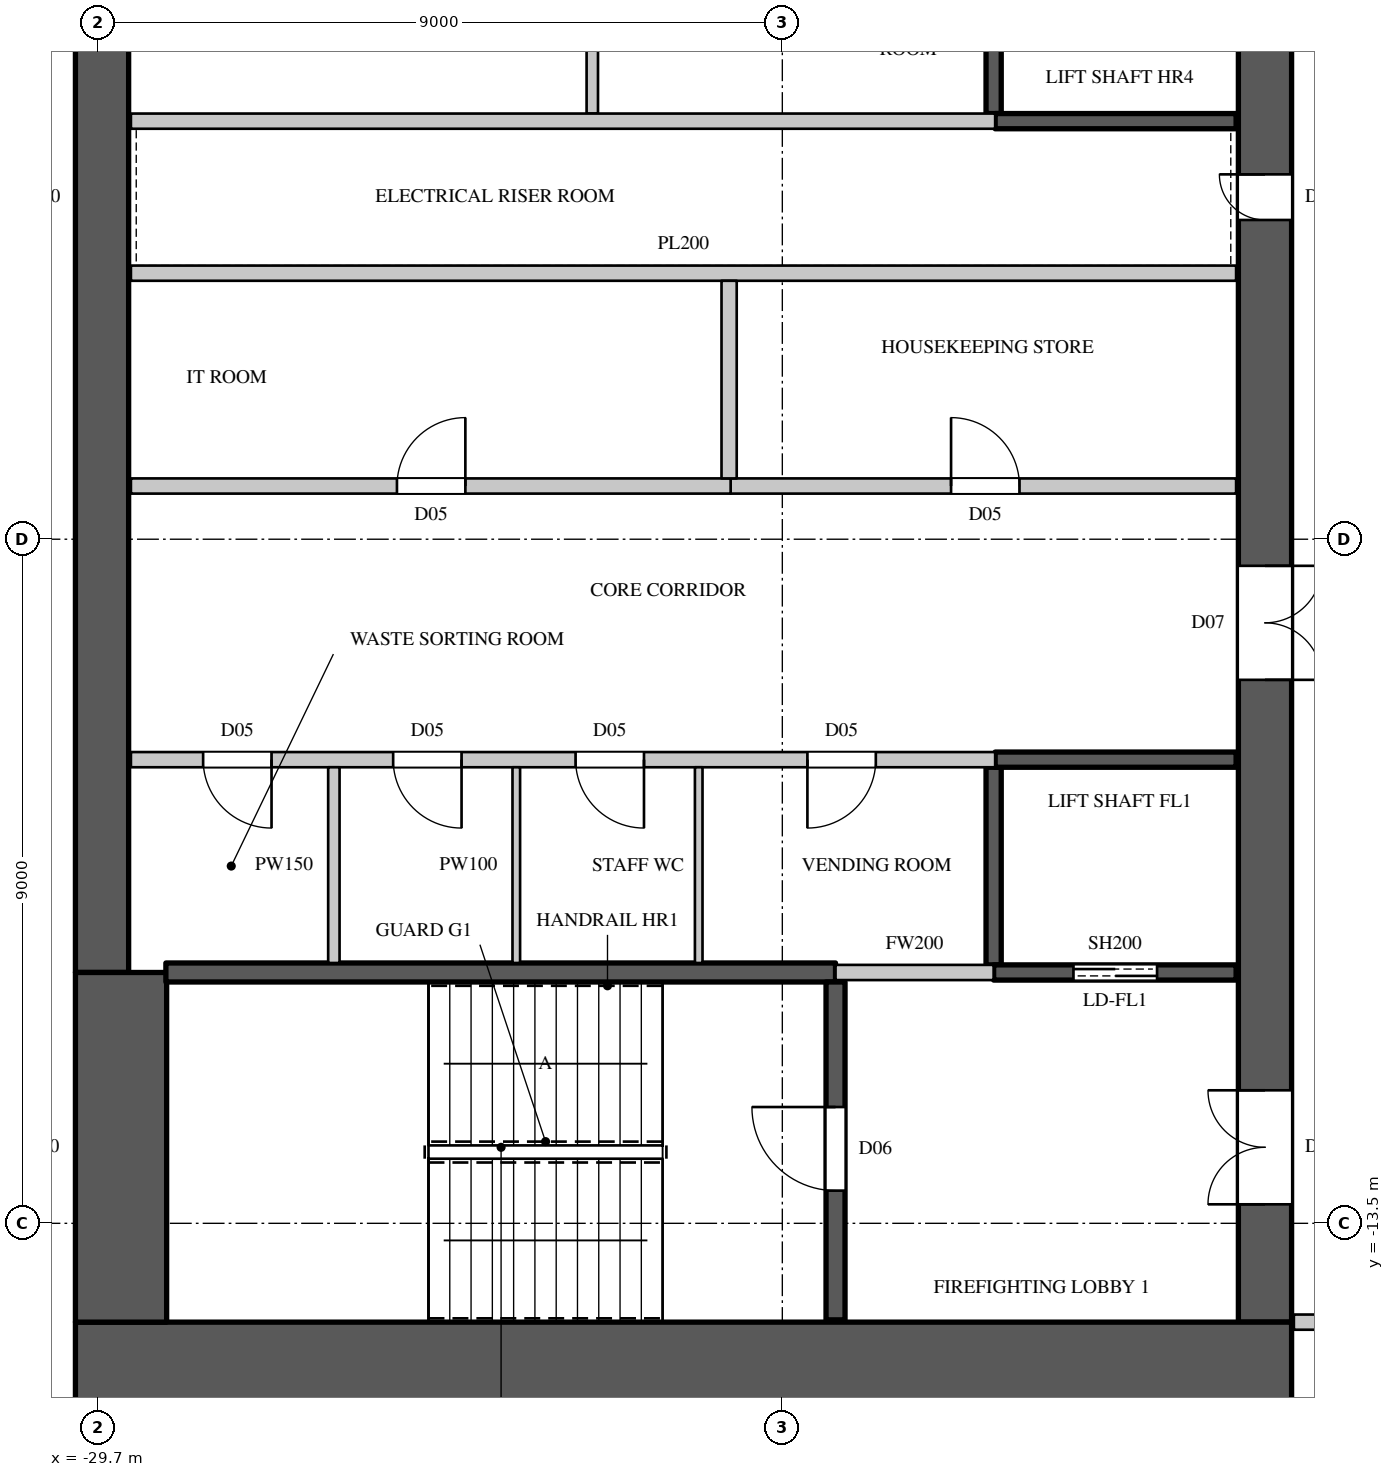
"""IFC4 building model, lengths in metres.
Left out: names, types, materials, properties, quantities, classifications, styles, units other than length and angle.
Written with IfcOpenShell. Run it as: python <this file> out.ifc"""

import sys

from ifc_helpers import new_model, si_unit, direction, frame, frame_2d, origin, place, context, subcontext, project, spatial, rectangle, extrude, element, fill, save


model = new_model("IFC4")
c1 = context("Model", 3, precision=1e-05, world=origin(), true_north=direction((0.0, 1.0)))
c2 = subcontext(c1, "Body", "Model", "MODEL_VIEW")
j1 = project(units=[si_unit("LENGTHUNIT", "METRE"), si_unit("PLANEANGLEUNIT", "RADIAN")], contexts=[c1])
p1 = place(None, origin())
s1 = spatial("IfcSite", under=j1, at=p1, CompositionType="ELEMENT")
p2 = place(p1, origin())
s2 = spatial("IfcBuilding", under=s1, at=p2, CompositionType="ELEMENT")
p3 = place(p2, frame((0.0, 0.0, 243.4)))
s3 = spatial("IfcBuildingStorey", under=s2, at=p3, CompositionType="ELEMENT", Elevation=243.4)
p4 = place(p3, frame((-30.0, -15.4, 0.0), z_axis=(0.0, 0.0, 1.0), x_axis=(1.0, 0.0, 0.0)))
e1 = element("IfcWall", 1, at=p4, inside=s3, PredefinedType="SHEAR", context=c2, shape_type="SweptSolid", body=[
    extrude(rectangle(XDim=16.0, YDim=1.2, at=frame_2d((8.0, 0.0))), origin(), (0.0, 0.0, 1.0), 4.1),
])
p5 = place(p3, frame((-14.35, -14.8, 0.0), z_axis=(0.0, 0.0, 1.0), x_axis=(0.0, 1.0, 0.0)))
e2 = element("IfcWall", 2, at=p5, inside=s3, PredefinedType="SHEAR", context=c2, shape_type="SweptSolid", body=[
    extrude(rectangle(XDim=29.6, YDim=0.7, at=frame_2d((14.8, 0.0))), origin(), (0.0, 0.0, 1.0), 4.1),
])
p6 = place(p5, frame((1.55, 0.0, 0.0)))
e3 = element("IfcOpeningElement", 3, at=p6, cuts=e2, PredefinedType="OPENING", context=c2, shape_type="SweptSolid", body=[
    extrude(rectangle(XDim=1.5, YDim=2.4, at=frame_2d((0.75, 1.2))), frame((0.0, 0.36, 0.0), z_axis=(0.0, -1.0, 0.0), x_axis=(1.0, 0.0, 0.0)), (0.0, 0.0, 1.0), 0.72),
])
p7 = place(p5, frame((26.55, 0.0, 0.0)))
e4 = element("IfcOpeningElement", 4, at=p7, cuts=e2, PredefinedType="OPENING", context=c2, shape_type="SweptSolid", body=[
    extrude(rectangle(XDim=1.5, YDim=2.4, at=frame_2d((0.75, 1.2))), frame((0.0, 0.36, 0.0), z_axis=(0.0, -1.0, 0.0), x_axis=(1.0, 0.0, 0.0)), (0.0, 0.0, 1.0), 0.72),
])
p8 = place(p5, frame((8.45, 0.0, 0.0)))
e5 = element("IfcOpeningElement", 5, at=p8, cuts=e2, PredefinedType="OPENING", context=c2, shape_type="SweptSolid", body=[
    extrude(rectangle(XDim=1.5, YDim=2.4, at=frame_2d((0.75, 1.2))), frame((0.0, 0.36, 0.0), z_axis=(0.0, -1.0, 0.0), x_axis=(1.0, 0.0, 0.0)), (0.0, 0.0, 1.0), 0.72),
])
p9 = place(p5, frame((19.65, 0.0, 0.0)))
e6 = element("IfcOpeningElement", 6, at=p9, cuts=e2, PredefinedType="OPENING", context=c2, shape_type="SweptSolid", body=[
    extrude(rectangle(XDim=1.5, YDim=2.4, at=frame_2d((0.75, 1.2))), frame((0.0, 0.36, 0.0), z_axis=(0.0, -1.0, 0.0), x_axis=(1.0, 0.0, 0.0)), (0.0, 0.0, 1.0), 0.72),
])
p10 = place(p5, frame((14.5, 0.0, 0.0)))
e7 = element("IfcOpeningElement", 7, at=p10, cuts=e2, PredefinedType="OPENING", context=c2, shape_type="SweptSolid", body=[
    extrude(rectangle(XDim=0.6, YDim=2.0, at=frame_2d((0.3, 1.0))), frame((0.0, 0.36, 0.0), z_axis=(0.0, -1.0, 0.0), x_axis=(1.0, 0.0, 0.0)), (0.0, 0.0, 1.0), 0.72),
])
p11 = place(p3, frame((-29.65, -10.2, 0.0), z_axis=(0.0, 0.0, 1.0), x_axis=(0.0, 1.0, 0.0)))
e8 = element("IfcWall", 8, at=p11, inside=s3, PredefinedType="SHEAR", context=c2, shape_type="SweptSolid", body=[
    extrude(rectangle(XDim=20.4, YDim=0.7, at=frame_2d((10.2, 0.0))), origin(), (0.0, 0.0, 1.0), 4.1),
])
p12 = place(p3, frame((-29.4, -14.8, 0.0), z_axis=(0.0, 0.0, 1.0), x_axis=(0.0, 1.0, 0.0)))
e9 = element("IfcWall", 9, at=p12, inside=s3, PredefinedType="SHEAR", context=c2, shape_type="SweptSolid", body=[
    extrude(rectangle(XDim=4.6, YDim=1.2, at=frame_2d((2.3, 0.0))), origin(), (0.0, 0.0, 1.0), 4.1),
])
p13 = place(p3, frame((-29.27, -7.4, 0.0), z_axis=(0.0, 0.0, 1.0), x_axis=(1.0, 0.0, 0.0)))
e10 = element("IfcWall", 10, at=p13, inside=s3, PredefinedType="PARTITIONING", context=c2, shape_type="SweptSolid", body=[
    extrude(rectangle(XDim=11.37, YDim=0.2, at=frame_2d((5.685, 0.0))), origin(), (0.0, 0.0, 1.0), 3.8),
])
p14 = place(p13, frame((0.95, 0.0, 0.0)))
e11 = element("IfcOpeningElement", 11, at=p14, cuts=e10, PredefinedType="OPENING", context=c2, shape_type="SweptSolid", body=[
    extrude(rectangle(XDim=0.9, YDim=2.2, at=frame_2d((0.45, 1.1))), frame((0.0, 0.11, 0.0), z_axis=(0.0, -1.0, 0.0), x_axis=(1.0, 0.0, 0.0)), (0.0, 0.0, 1.0), 0.22),
])
p15 = place(p13, frame((3.45, 0.0, 0.0)))
e12 = element("IfcOpeningElement", 12, at=p15, cuts=e10, PredefinedType="OPENING", context=c2, shape_type="SweptSolid", body=[
    extrude(rectangle(XDim=0.9, YDim=2.2, at=frame_2d((0.45, 1.1))), frame((0.0, 0.11, 0.0), z_axis=(0.0, -1.0, 0.0), x_axis=(1.0, 0.0, 0.0)), (0.0, 0.0, 1.0), 0.22),
])
p16 = place(p13, frame((5.85, 0.0, 0.0)))
e13 = element("IfcOpeningElement", 13, at=p16, cuts=e10, PredefinedType="OPENING", context=c2, shape_type="SweptSolid", body=[
    extrude(rectangle(XDim=0.9, YDim=2.2, at=frame_2d((0.45, 1.1))), frame((0.0, 0.11, 0.0), z_axis=(0.0, -1.0, 0.0), x_axis=(1.0, 0.0, 0.0)), (0.0, 0.0, 1.0), 0.22),
])
p17 = place(p13, frame((8.9, 0.0, 0.0)))
e14 = element("IfcOpeningElement", 14, at=p17, cuts=e10, PredefinedType="OPENING", context=c2, shape_type="SweptSolid", body=[
    extrude(rectangle(XDim=0.9, YDim=2.2, at=frame_2d((0.45, 1.1))), frame((0.0, 0.11, 0.0), z_axis=(0.0, -1.0, 0.0), x_axis=(1.0, 0.0, 0.0)), (0.0, 0.0, 1.0), 0.22),
])
p18 = place(p3, frame((-21.38, -3.8, 0.0), z_axis=(0.0, 0.0, 1.0), x_axis=(1.0, 0.0, 0.0)))
e15 = element("IfcWall", 15, at=p18, inside=s3, PredefinedType="PARTITIONING", context=c2, shape_type="SweptSolid", body=[
    extrude(rectangle(XDim=6.65, YDim=0.2, at=frame_2d((3.325, 0.0))), origin(), (0.0, 0.0, 1.0), 3.8),
])
p19 = place(p18, frame((2.9, 0.0, 0.0)))
e16 = element("IfcOpeningElement", 16, at=p19, cuts=e15, PredefinedType="OPENING", context=c2, shape_type="SweptSolid", body=[
    extrude(rectangle(XDim=0.9, YDim=2.2, at=frame_2d((0.45, 1.1))), frame((0.0, 0.11, 0.0), z_axis=(0.0, -1.0, 0.0), x_axis=(1.0, 0.0, 0.0)), (0.0, 0.0, 1.0), 0.22),
])
p20 = place(p3, frame((-20.0, -10.2, 0.0), z_axis=(0.0, 0.0, 1.0), x_axis=(1.0, 0.0, 0.0)))
e17 = element("IfcWall", 17, at=p20, inside=s3, PredefinedType="PARTITIONING", context=c2, shape_type="SweptSolid", body=[
    extrude(rectangle(XDim=2.08, YDim=0.2, at=frame_2d((1.04, 0.0))), origin(), (0.0, 0.0, 1.0), 3.8),
])
p21 = place(p3, frame((-13.97, -14.8, 0.0), z_axis=(0.0, 0.0, 1.0), x_axis=(1.0, 0.0, 0.0)))
e18 = element("IfcWall", 18, at=p21, inside=s3, PredefinedType="PARTITIONING", context=c2, shape_type="SweptSolid", body=[
    extrude(rectangle(XDim=2.87, YDim=0.2, at=frame_2d((1.435, 0.0))), origin(), (0.0, 0.0, 1.0), 3.8),
])
p22 = place(p3, frame((-26.6, -10.075, 0.0), z_axis=(0.0, 0.0, 1.0), x_axis=(0.0, 1.0, 0.0)))
e19 = element("IfcWall", 19, at=p22, inside=s3, PredefinedType="PARTITIONING", context=c2, shape_type="SweptSolid", body=[
    extrude(rectangle(XDim=2.575, YDim=0.15, at=frame_2d((1.288, 0.0))), origin(), (0.0, 0.0, 1.0), 3.8),
])
p23 = place(p3, frame((-23.2, 1.1, 0.0), z_axis=(0.0, 0.0, 1.0), x_axis=(0.0, 1.0, 0.0)))
e20 = element("IfcWall", 20, at=p23, inside=s3, PredefinedType="PARTITIONING", context=c2, shape_type="SweptSolid", body=[
    extrude(rectangle(XDim=2.6, YDim=0.15, at=frame_2d((1.3, 0.0))), origin(), (0.0, 0.0, 1.0), 3.8),
])
p24 = place(p3, frame((-29.27, -3.8, 0.0), z_axis=(0.0, 0.0, 1.0), x_axis=(1.0, 0.0, 0.0)))
e21 = element("IfcWall", 21, at=p24, inside=s3, PredefinedType="PARTITIONING", context=c2, shape_type="SweptSolid", body=[
    extrude(rectangle(XDim=7.89, YDim=0.2, at=frame_2d((3.945, 0.0))), origin(), (0.0, 0.0, 1.0), 3.8),
])
p25 = place(p24, frame((3.5, 0.0, 0.0)))
e22 = element("IfcOpeningElement", 22, at=p25, cuts=e21, PredefinedType="OPENING", context=c2, shape_type="SweptSolid", body=[
    extrude(rectangle(XDim=0.9, YDim=2.2, at=frame_2d((0.45, 1.1))), frame((0.0, 0.11, 0.0), z_axis=(0.0, -1.0, 0.0), x_axis=(1.0, 0.0, 0.0)), (0.0, 0.0, 1.0), 0.22),
])
p26 = place(p3, frame((-29.27, -1.0, 0.0), z_axis=(0.0, 0.0, 1.0), x_axis=(1.0, 0.0, 0.0)))
e23 = element("IfcWall", 23, at=p26, inside=s3, PredefinedType="PARTITIONING", context=c2, shape_type="SweptSolid", body=[
    extrude(rectangle(XDim=14.54, YDim=0.2, at=frame_2d((7.27, 0.0))), origin(), (0.0, 0.0, 1.0), 3.8),
])
p27 = place(p3, frame((-29.27, 1.0, 0.0), z_axis=(0.0, 0.0, 1.0), x_axis=(1.0, 0.0, 0.0)))
e24 = element("IfcWall", 24, at=p27, inside=s3, PredefinedType="PARTITIONING", context=c2, shape_type="SweptSolid", body=[
    extrude(rectangle(XDim=11.37, YDim=0.2, at=frame_2d((5.685, 0.0))), origin(), (0.0, 0.0, 1.0), 3.8),
])
p28 = place(p3, frame((-21.4, -3.7, 0.0), z_axis=(0.0, 0.0, 1.0), x_axis=(0.0, 1.0, 0.0)))
e25 = element("IfcWall", 25, at=p28, inside=s3, PredefinedType="PARTITIONING", context=c2, shape_type="SweptSolid", body=[
    extrude(rectangle(XDim=2.6, YDim=0.2, at=frame_2d((1.3, 0.0))), origin(), (0.0, 0.0, 1.0), 3.8),
])
p29 = place(p3, frame((-17.92, -10.1, 0.0), z_axis=(0.0, 0.0, 1.0), x_axis=(0.0, 1.0, 0.0)))
e26 = element("IfcWall", 26, at=p29, inside=s3, PredefinedType="SHEAR", context=c2, shape_type="SweptSolid", body=[
    extrude(rectangle(XDim=2.6, YDim=0.2, at=frame_2d((1.3, 0.0))), origin(), (0.0, 0.0, 1.0), 3.8),
])
p30 = place(p3, frame((-17.92, -10.2, 0.0), z_axis=(0.0, 0.0, 1.0), x_axis=(1.0, 0.0, 0.0)))
e27 = element("IfcWall", 27, at=p30, inside=s3, PredefinedType="SHEAR", context=c2, shape_type="SweptSolid", body=[
    extrude(rectangle(XDim=3.19, YDim=0.2, at=frame_2d((1.595, 0.0))), origin(), (0.0, 0.0, 1.0), 3.8),
])
p31 = place(p30, frame((1.05, 0.0, 0.0)))
e28 = element("IfcOpeningElement", 28, at=p31, cuts=e27, PredefinedType="OPENING", context=c2, shape_type="SweptSolid", body=[
    extrude(rectangle(XDim=1.1, YDim=2.2, at=frame_2d((0.55, 1.1))), frame((0.0, 0.11, 0.0), z_axis=(0.0, -1.0, 0.0), x_axis=(1.0, 0.0, 0.0)), (0.0, 0.0, 1.0), 0.22),
])
p32 = place(p3, frame((-17.9, -7.4, 0.0), z_axis=(0.0, 0.0, 1.0), x_axis=(1.0, 0.0, 0.0)))
e29 = element("IfcWall", 29, at=p32, inside=s3, PredefinedType="SHEAR", context=c2, shape_type="SweptSolid", body=[
    extrude(rectangle(XDim=3.17, YDim=0.2, at=frame_2d((1.585, 0.0))), origin(), (0.0, 0.0, 1.0), 3.8),
])
p33 = place(p3, frame((-17.92, 1.1, 0.0), z_axis=(0.0, 0.0, 1.0), x_axis=(0.0, 1.0, 0.0)))
e30 = element("IfcWall", 30, at=p33, inside=s3, PredefinedType="SHEAR", context=c2, shape_type="SweptSolid", body=[
    extrude(rectangle(XDim=2.6, YDim=0.2, at=frame_2d((1.3, 0.0))), origin(), (0.0, 0.0, 1.0), 3.8),
])
p34 = place(p3, frame((-17.9, 1.0, 0.0), z_axis=(0.0, 0.0, 1.0), x_axis=(1.0, 0.0, 0.0)))
e31 = element("IfcWall", 31, at=p34, inside=s3, PredefinedType="SHEAR", context=c2, shape_type="SweptSolid", body=[
    extrude(rectangle(XDim=3.17, YDim=0.2, at=frame_2d((1.585, 0.0))), origin(), (0.0, 0.0, 1.0), 3.8),
])
p35 = place(p3, frame((-28.81, -10.2, 0.0), z_axis=(0.0, 0.0, 1.0), x_axis=(1.0, 0.0, 0.0)))
e32 = element("IfcWall", 32, at=p35, inside=s3, PredefinedType="SHEAR", context=c2, shape_type="SweptSolid", body=[
    extrude(rectangle(XDim=8.81, YDim=0.25, at=frame_2d((4.405, 0.0))), origin(), (0.0, 0.0, 1.0), 3.8),
])
p36 = place(p3, frame((-20.0, -14.77, 0.0), z_axis=(0.0, 0.0, 1.0), x_axis=(0.0, 1.0, 0.0)))
e33 = element("IfcWall", 33, at=p36, inside=s3, PredefinedType="SHEAR", context=c2, shape_type="SweptSolid", body=[
    extrude(rectangle(XDim=4.445, YDim=0.25, at=frame_2d((2.223, 0.0))), origin(), (0.0, 0.0, 1.0), 3.8),
])
p37 = place(p36, frame((1.7, 0.0, 0.0)))
e34 = element("IfcOpeningElement", 34, at=p37, cuts=e33, PredefinedType="OPENING", context=c2, shape_type="SweptSolid", body=[
    extrude(rectangle(XDim=1.1, YDim=2.2, at=frame_2d((0.55, 1.1))), frame((0.0, 0.135, 0.0), z_axis=(0.0, -1.0, 0.0), x_axis=(1.0, 0.0, 0.0)), (0.0, 0.0, 1.0), 0.27),
])
for number, where, z_axis, x_axis in (
    (35, (-24.2, -10.075, 0.0), (0.0, 0.0, 1.0), (0.0, 1.0, 0.0)),
    (36, (-21.8, -10.075, 0.0), (0.0, 0.0, 1.0), (0.0, 1.0, 0.0)),
):
    element("IfcWall", number, at=place(p3, frame(where, z_axis=z_axis, x_axis=x_axis)), inside=s3, PredefinedType="PARTITIONING", context=c2, shape_type="SweptSolid", body=[
        extrude(rectangle(XDim=2.575, YDim=0.1, at=frame_2d((1.288, 0.0))), origin(), (0.0, 0.0, 1.0), 3.8),
    ])
p38 = place(p37, origin())
e37 = element("IfcDoor", 37, at=p38, inside=s3, OperationType="SINGLE_SWING_RIGHT", PredefinedType="DOOR", context=c2, shape_type="SweptSolid", body=[
    extrude(rectangle(XDim=1.1, YDim=2.2, at=frame_2d((0.55, 1.1))), frame((0.0, 0.025, 0.0), z_axis=(0.0, -1.0, 0.0), x_axis=(1.0, 0.0, 0.0)), (0.0, 0.0, 1.0), 0.05),
])
fill(e34, e37)
p39 = place(p14, origin())
e38 = element("IfcDoor", 38, at=p39, inside=s3, OperationType="SINGLE_SWING_LEFT", PredefinedType="DOOR", context=c2, shape_type="SweptSolid", body=[
    extrude(rectangle(XDim=0.9, YDim=2.2, at=frame_2d((0.45, 1.1))), frame((0.0, 0.025, 0.0), z_axis=(0.0, -1.0, 0.0), x_axis=(1.0, 0.0, 0.0)), (0.0, 0.0, 1.0), 0.05),
])
fill(e11, e38)
p40 = place(p15, origin())
e39 = element("IfcDoor", 39, at=p40, inside=s3, OperationType="SINGLE_SWING_LEFT", PredefinedType="DOOR", context=c2, shape_type="SweptSolid", body=[
    extrude(rectangle(XDim=0.9, YDim=2.2, at=frame_2d((0.45, 1.1))), frame((0.0, 0.025, 0.0), z_axis=(0.0, -1.0, 0.0), x_axis=(1.0, 0.0, 0.0)), (0.0, 0.0, 1.0), 0.05),
])
fill(e12, e39)
p41 = place(p16, origin())
e40 = element("IfcDoor", 40, at=p41, inside=s3, OperationType="SINGLE_SWING_LEFT", PredefinedType="DOOR", context=c2, shape_type="SweptSolid", body=[
    extrude(rectangle(XDim=0.9, YDim=2.2, at=frame_2d((0.45, 1.1))), frame((0.0, 0.025, 0.0), z_axis=(0.0, -1.0, 0.0), x_axis=(1.0, 0.0, 0.0)), (0.0, 0.0, 1.0), 0.05),
])
fill(e13, e40)
p42 = place(p17, origin())
e41 = element("IfcDoor", 41, at=p42, inside=s3, OperationType="SINGLE_SWING_RIGHT", PredefinedType="DOOR", context=c2, shape_type="SweptSolid", body=[
    extrude(rectangle(XDim=0.9, YDim=2.2, at=frame_2d((0.45, 1.1))), frame((0.0, 0.025, 0.0), z_axis=(0.0, -1.0, 0.0), x_axis=(1.0, 0.0, 0.0)), (0.0, 0.0, 1.0), 0.05),
])
fill(e14, e41)
p43 = place(p25, origin())
e42 = element("IfcDoor", 42, at=p43, inside=s3, OperationType="SINGLE_SWING_RIGHT", PredefinedType="DOOR", context=c2, shape_type="SweptSolid", body=[
    extrude(rectangle(XDim=0.9, YDim=2.2, at=frame_2d((0.45, 1.1))), frame((0.0, 0.025, 0.0), z_axis=(0.0, -1.0, 0.0), x_axis=(1.0, 0.0, 0.0)), (0.0, 0.0, 1.0), 0.05),
])
fill(e22, e42)
p44 = place(p19, origin())
e43 = element("IfcDoor", 43, at=p44, inside=s3, OperationType="SINGLE_SWING_LEFT", PredefinedType="DOOR", context=c2, shape_type="SweptSolid", body=[
    extrude(rectangle(XDim=0.9, YDim=2.2, at=frame_2d((0.45, 1.1))), frame((0.0, 0.025, 0.0), z_axis=(0.0, -1.0, 0.0), x_axis=(1.0, 0.0, 0.0)), (0.0, 0.0, 1.0), 0.05),
])
fill(e16, e43)
p45 = place(p31, origin())
e44 = element("IfcDoor", 44, at=p45, inside=s3, OperationType="DOUBLE_DOOR_SLIDING", PredefinedType="DOOR", context=c2, shape_type="SweptSolid", body=[
    extrude(rectangle(XDim=1.1, YDim=2.2, at=frame_2d((0.55, 1.1))), frame((0.0, 0.025, 0.0), z_axis=(0.0, -1.0, 0.0), x_axis=(1.0, 0.0, 0.0)), (0.0, 0.0, 1.0), 0.05),
])
fill(e28, e44)
p46 = place(p6, origin())
e45 = element("IfcDoor", 45, at=p46, inside=s3, OperationType="DOUBLE_DOOR_SINGLE_SWING", PredefinedType="DOOR", context=c2, shape_type="SweptSolid", body=[
    extrude(rectangle(XDim=1.5, YDim=2.4, at=frame_2d((0.75, 1.2))), frame((0.0, 0.345, 0.0), z_axis=(0.0, -1.0, 0.0), x_axis=(1.0, 0.0, 0.0)), (0.0, 0.0, 1.0), 0.05),
])
fill(e3, e45)
p47 = place(p8, origin())
e46 = element("IfcDoor", 46, at=p47, inside=s3, OperationType="DOUBLE_DOOR_SINGLE_SWING", PredefinedType="DOOR", context=c2, shape_type="SweptSolid", body=[
    extrude(rectangle(XDim=1.5, YDim=2.4, at=frame_2d((0.75, 1.2))), frame((0.0, -0.295, 0.0), z_axis=(0.0, -1.0, 0.0), x_axis=(1.0, 0.0, 0.0)), (0.0, 0.0, 1.0), 0.05),
])
fill(e5, e46)
p48 = place(p10, origin())
e47 = element("IfcDoor", 47, at=p48, inside=s3, OperationType="SINGLE_SWING_RIGHT", PredefinedType="DOOR", context=c2, shape_type="SweptSolid", body=[
    extrude(rectangle(XDim=0.6, YDim=2.0, at=frame_2d((0.3, 1.0))), frame((0.0, 0.345, 0.0), z_axis=(0.0, -1.0, 0.0), x_axis=(1.0, 0.0, 0.0)), (0.0, 0.0, 1.0), 0.05),
])
fill(e7, e47)
save(model, sys.argv[1])
